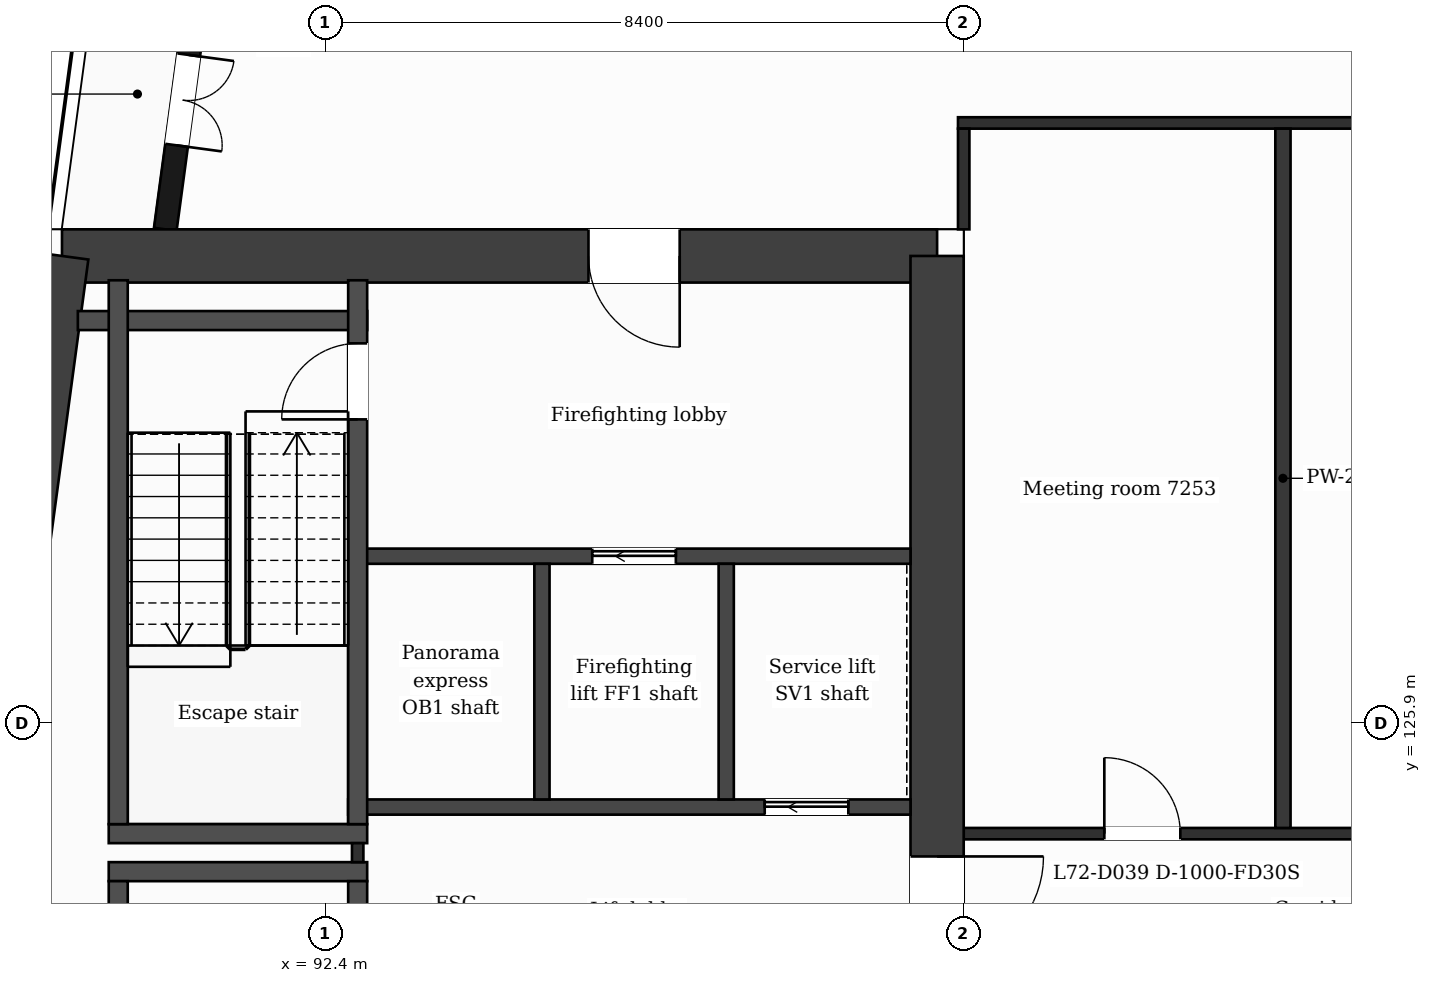
"""IFC4 building model, lengths in metres.
Left out: names, types, materials, properties, quantities, classifications, styles, units other than length and angle.
Written with IfcOpenShell. Run it as: python <this file> out.ifc"""

import sys

from ifc_helpers import new_model, si_unit, direction, frame, frame_2d, origin, place, context, subcontext, project, spatial, rectangle, extrude, element, fill, save


model = new_model("IFC4")
c1 = context("Model", 3, precision=1e-05, world=origin(), true_north=direction((0.0, 1.0)))
c2 = subcontext(c1, "Body", "Model", "MODEL_VIEW")
j1 = project(units=[si_unit("LENGTHUNIT", "METRE"), si_unit("PLANEANGLEUNIT", "RADIAN")], contexts=[c1])
p1 = place(None, origin())
s1 = spatial("IfcSite", under=j1, at=p1, CompositionType="ELEMENT")
p2 = place(p1, origin())
s2 = spatial("IfcBuilding", under=s1, at=p2, CompositionType="ELEMENT")
p3 = place(p2, frame((0.0, 0.0, 296.0)))
s3 = spatial("IfcBuildingStorey", under=s2, at=p3, CompositionType="ELEMENT", Elevation=296.0)
p4 = place(p3, frame((88.937, 132.05, 0.0), z_axis=(0.0, 0.0, 1.0), x_axis=(1.0, 0.0, 0.0)))
e1 = element("IfcWall", 1, at=p4, inside=s3, PredefinedType="SHEAR", context=c2, shape_type="SweptSolid", body=[
    extrude(rectangle(XDim=11.513, YDim=0.7, at=frame_2d((5.757, 0.0))), origin(), (0.0, 0.0, 1.0), 3.7),
])
p5 = place(p4, frame((6.927, 0.0, 0.0)))
e2 = element("IfcOpeningElement", 2, at=p5, cuts=e1, PredefinedType="OPENING", context=c2, shape_type="SweptSolid", body=[
    extrude(rectangle(XDim=1.2, YDim=2.1, at=frame_2d((0.6, 1.05))), frame((0.0, 0.36, 0.0), z_axis=(0.0, -1.0, 0.0), x_axis=(1.0, 0.0, 0.0)), (0.0, 0.0, 1.0), 0.72),
])
p6 = place(p3, frame((100.45, 132.05, 0.0), z_axis=(0.0, 0.0, 1.0), x_axis=(0.0, -1.0, 0.0)))
e3 = element("IfcWall", 3, at=p6, inside=s3, PredefinedType="SHEAR", context=c2, shape_type="SweptSolid", body=[
    extrude(rectangle(XDim=15.7, YDim=0.7, at=frame_2d((7.85, 0.0))), origin(), (0.0, 0.0, 1.0), 3.7),
])
p7 = place(p6, frame((7.9, 0.0, 0.0)))
e4 = element("IfcOpeningElement", 4, at=p7, cuts=e3, PredefinedType="OPENING", context=c2, shape_type="SweptSolid", body=[
    extrude(rectangle(XDim=1.4, YDim=2.1, at=frame_2d((0.7, 1.05))), frame((0.0, 0.36, 0.0), z_axis=(0.0, -1.0, 0.0), x_axis=(1.0, 0.0, 0.0)), (0.0, 0.0, 1.0), 0.72),
])
p8 = place(p3, frame((86.823, 116.35, 0.0), z_axis=(0.0, 0.0, 1.0), x_axis=(0.133416378607, 0.99106007382, 0.0)))
e5 = element("IfcWall", 5, at=p8, inside=s3, PredefinedType="SHEAR", context=c2, shape_type="SweptSolid", body=[
    extrude(rectangle(XDim=15.842, YDim=0.7, at=frame_2d((7.921, 0.0))), origin(), (0.0, 0.0, 1.0), 3.7),
])
p9 = place(p3, frame((91.177, 138.95, 0.0), z_axis=(0.0, 0.0, 1.0), x_axis=(-0.133426664613, -0.991058689065, 0.0)))
e6 = element("IfcWall", 6, at=p9, inside=s3, PredefinedType="SOLIDWALL", context=c2, shape_type="SweptSolid", body=[
    extrude(rectangle(XDim=6.609, YDim=0.3, at=frame_2d((3.305, 0.0))), origin(), (0.0, 0.0, 1.0), 3.38),
])
p10 = place(p9, frame((1.039, 0.0, 0.9)))
e7 = element("IfcOpeningElement", 7, at=p10, cuts=e6, PredefinedType="OPENING", context=c2, shape_type="SweptSolid", body=[
    extrude(rectangle(XDim=1.2, YDim=2.1, at=frame_2d((0.6, 1.05))), frame((0.0, 0.16, 0.0), z_axis=(0.0, -1.0, 0.0), x_axis=(1.0, 0.0, 0.0)), (0.0, 0.0, 1.0), 0.32),
])
p11 = place(p9, frame((4.294, 0.0, 0.0)))
e8 = element("IfcOpeningElement", 8, at=p11, cuts=e6, PredefinedType="OPENING", context=c2, shape_type="SweptSolid", body=[
    extrude(rectangle(XDim=1.2, YDim=2.4, at=frame_2d((0.6, 1.2))), frame((0.0, 0.16, 0.0), z_axis=(0.0, -1.0, 0.0), x_axis=(1.0, 0.0, 0.0)), (0.0, 0.0, 1.0), 0.32),
])
for number, where, z_axis, x_axis in (
    (9, (89.552, 123.95, 0.0), (0.0, 0.0, 1.0), (1.0, 0.0, 0.0)),
    (10, (89.552, 124.45, 0.0), (0.0, 0.0, 1.0), (1.0, 0.0, 0.0)),
):
    element("IfcWall", number, at=place(p3, frame(where, z_axis=z_axis, x_axis=x_axis)), inside=s3, PredefinedType="PARTITIONING", context=c2, shape_type="SweptSolid", body=[
        extrude(rectangle(XDim=3.4, YDim=0.25, at=frame_2d((1.7, 0.0))), origin(), (0.0, 0.0, 1.0), 3.38),
    ])
p12 = place(p3, frame((100.8, 124.45, 0.0), z_axis=(0.0, 0.0, 1.0), x_axis=(1.0, 0.0, 0.0)))
e11 = element("IfcWall", 11, at=p12, inside=s3, PredefinedType="PARTITIONING", context=c2, shape_type="SweptSolid", body=[
    extrude(rectangle(XDim=25.2, YDim=0.15, at=frame_2d((12.6, 0.0))), origin(), (0.0, 0.0, 1.0), 3.38),
])
p13 = place(p12, frame((1.85, 0.0, 0.0)))
e12 = element("IfcOpeningElement", 12, at=p13, cuts=e11, PredefinedType="OPENING", context=c2, shape_type="SweptSolid", body=[
    extrude(rectangle(XDim=1.0, YDim=2.1, at=frame_2d((0.5, 1.05))), frame((0.0, 0.085, 0.0), z_axis=(0.0, -1.0, 0.0), x_axis=(1.0, 0.0, 0.0)), (0.0, 0.0, 1.0), 0.17),
])
p14 = place(p12, frame((6.425, 0.0, 0.0)))
e13 = element("IfcOpeningElement", 13, at=p14, cuts=e11, PredefinedType="OPENING", context=c2, shape_type="SweptSolid", body=[
    extrude(rectangle(XDim=1.0, YDim=2.1, at=frame_2d((0.5, 1.05))), frame((0.0, 0.085, 0.0), z_axis=(0.0, -1.0, 0.0), x_axis=(1.0, 0.0, 0.0)), (0.0, 0.0, 1.0), 0.17),
])
p15 = place(p12, frame((9.4, 0.0, 0.0)))
e14 = element("IfcOpeningElement", 14, at=p15, cuts=e11, PredefinedType="OPENING", context=c2, shape_type="SweptSolid", body=[
    extrude(rectangle(XDim=1.0, YDim=2.1, at=frame_2d((0.5, 1.05))), frame((0.0, 0.085, 0.0), z_axis=(0.0, -1.0, 0.0), x_axis=(1.0, 0.0, 0.0)), (0.0, 0.0, 1.0), 0.17),
])
p16 = place(p12, frame((14.825, 0.0, 0.0)))
e15 = element("IfcOpeningElement", 15, at=p16, cuts=e11, PredefinedType="OPENING", context=c2, shape_type="SweptSolid", body=[
    extrude(rectangle(XDim=1.0, YDim=2.1, at=frame_2d((0.5, 1.05))), frame((0.0, 0.085, 0.0), z_axis=(0.0, -1.0, 0.0), x_axis=(1.0, 0.0, 0.0)), (0.0, 0.0, 1.0), 0.17),
])
p17 = place(p12, frame((18.825, 0.0, 0.0)))
e16 = element("IfcOpeningElement", 16, at=p17, cuts=e11, PredefinedType="OPENING", context=c2, shape_type="SweptSolid", body=[
    extrude(rectangle(XDim=1.0, YDim=2.1, at=frame_2d((0.5, 1.05))), frame((0.0, 0.085, 0.0), z_axis=(0.0, -1.0, 0.0), x_axis=(1.0, 0.0, 0.0)), (0.0, 0.0, 1.0), 0.17),
])
p18 = place(p3, frame((92.702, 124.8, 0.0), z_axis=(0.0, 0.0, 1.0), x_axis=(1.0, 0.0, 0.0)))
e17 = element("IfcWall", 17, at=p18, inside=s3, PredefinedType="PARTITIONING", context=c2, shape_type="SweptSolid", body=[
    extrude(rectangle(XDim=7.398, YDim=0.2, at=frame_2d((3.699, 0.0))), origin(), (0.0, 0.0, 1.0), 3.38),
])
p19 = place(p18, frame((5.48, 0.0, 0.0)))
e18 = element("IfcOpeningElement", 18, at=p19, cuts=e17, PredefinedType="OPENING", context=c2, shape_type="SweptSolid", body=[
    extrude(rectangle(XDim=1.1, YDim=2.1, at=frame_2d((0.55, 1.05))), frame((0.0, 0.11, 0.0), z_axis=(0.0, -1.0, 0.0), x_axis=(1.0, 0.0, 0.0)), (0.0, 0.0, 1.0), 0.22),
])
p20 = place(p3, frame((92.827, 128.1, 0.0), z_axis=(0.0, 0.0, 1.0), x_axis=(1.0, 0.0, 0.0)))
e19 = element("IfcWall", 19, at=p20, inside=s3, PredefinedType="PARTITIONING", context=c2, shape_type="SweptSolid", body=[
    extrude(rectangle(XDim=7.273, YDim=0.2, at=frame_2d((3.637, 0.0))), origin(), (0.0, 0.0, 1.0), 3.38),
])
p21 = place(p20, frame((3.086, 0.0, 0.0)))
e20 = element("IfcOpeningElement", 20, at=p21, cuts=e19, PredefinedType="OPENING", context=c2, shape_type="SweptSolid", body=[
    extrude(rectangle(XDim=1.1, YDim=2.1, at=frame_2d((0.55, 1.05))), frame((0.0, 0.11, 0.0), z_axis=(0.0, -1.0, 0.0), x_axis=(1.0, 0.0, 0.0)), (0.0, 0.0, 1.0), 0.22),
])
p22 = place(p3, frame((89.146, 131.2, 0.0), z_axis=(0.0, 0.0, 1.0), x_axis=(1.0, 0.0, 0.0)))
e21 = element("IfcWall", 21, at=p22, inside=s3, PredefinedType="PARTITIONING", context=c2, shape_type="SweptSolid", body=[
    extrude(rectangle(XDim=3.806, YDim=0.25, at=frame_2d((1.903, 0.0))), origin(), (0.0, 0.0, 1.0), 3.38),
])
p23 = place(p3, frame((100.725, 133.8, 0.0), z_axis=(0.0, 0.0, 1.0), x_axis=(1.0, 0.0, 0.0)))
e22 = element("IfcWall", 22, at=p23, inside=s3, PredefinedType="PARTITIONING", context=c2, shape_type="SweptSolid", body=[
    extrude(rectangle(XDim=25.35, YDim=0.15, at=frame_2d((12.675, 0.0))), origin(), (0.0, 0.0, 1.0), 3.38),
])
p24 = place(p23, frame((9.825, 0.0, 0.0)))
e23 = element("IfcOpeningElement", 23, at=p24, cuts=e22, PredefinedType="OPENING", context=c2, shape_type="SweptSolid", body=[
    extrude(rectangle(XDim=1.0, YDim=2.1, at=frame_2d((0.5, 1.05))), frame((0.0, 0.085, 0.0), z_axis=(0.0, -1.0, 0.0), x_axis=(1.0, 0.0, 0.0)), (0.0, 0.0, 1.0), 0.17),
])
for number, where, z_axis, x_axis in (
    (24, (89.677, 116.67, 0.0), (0.0, 0.0, 1.0), (0.0, 1.0, 0.0)),
    (25, (89.677, 124.575, 0.0), (0.0, 0.0, 1.0), (0.0, 1.0, 0.0)),
):
    element("IfcWall", number, at=place(p3, frame(where, z_axis=z_axis, x_axis=x_axis)), inside=s3, PredefinedType="PARTITIONING", context=c2, shape_type="SweptSolid", body=[
        extrude(rectangle(XDim=7.155, YDim=0.25, at=frame_2d((3.578, 0.0))), origin(), (0.0, 0.0, 1.0), 3.38),
    ])
p25 = place(p3, frame((92.827, 124.075, 0.0), z_axis=(0.0, 0.0, 1.0), x_axis=(0.0, 1.0, 0.0)))
e26 = element("IfcWall", 26, at=p25, inside=s3, PredefinedType="PARTITIONING", context=c2, shape_type="SweptSolid", body=[
    extrude(rectangle(XDim=0.25, YDim=0.15, at=frame_2d((0.125, 0.0))), origin(), (0.0, 0.0, 1.0), 3.38),
])
p26 = place(p3, frame((92.827, 116.67, 0.0), z_axis=(0.0, 0.0, 1.0), x_axis=(0.0, 1.0, 0.0)))
e27 = element("IfcWall", 27, at=p26, inside=s3, PredefinedType="PARTITIONING", context=c2, shape_type="SweptSolid", body=[
    extrude(rectangle(XDim=7.155, YDim=0.25, at=frame_2d((3.578, 0.0))), origin(), (0.0, 0.0, 1.0), 3.38),
])
p27 = place(p26, frame((5.855, 0.0, 0.0)))
e28 = element("IfcOpeningElement", 28, at=p27, cuts=e27, PredefinedType="OPENING", context=c2, shape_type="SweptSolid", body=[
    extrude(rectangle(XDim=0.95, YDim=2.1, at=frame_2d((0.475, 1.05))), frame((0.0, 0.135, 0.0), z_axis=(0.0, -1.0, 0.0), x_axis=(1.0, 0.0, 0.0)), (0.0, 0.0, 1.0), 0.27),
])
p28 = place(p3, frame((92.827, 124.575, 0.0), z_axis=(0.0, 0.0, 1.0), x_axis=(0.0, 1.0, 0.0)))
e29 = element("IfcWall", 29, at=p28, inside=s3, PredefinedType="PARTITIONING", context=c2, shape_type="SweptSolid", body=[
    extrude(rectangle(XDim=7.155, YDim=0.25, at=frame_2d((3.578, 0.0))), origin(), (0.0, 0.0, 1.0), 3.38),
])
p29 = place(p28, frame((5.325, 0.0, 0.0)))
e30 = element("IfcOpeningElement", 30, at=p29, cuts=e29, PredefinedType="OPENING", context=c2, shape_type="SweptSolid", body=[
    extrude(rectangle(XDim=1.0, YDim=2.1, at=frame_2d((0.5, 1.05))), frame((0.0, 0.135, 0.0), z_axis=(0.0, -1.0, 0.0), x_axis=(1.0, 0.0, 0.0)), (0.0, 0.0, 1.0), 0.27),
])
for number, where, z_axis, x_axis in (
    (31, (95.251, 124.9, 0.0), (0.0, 0.0, 1.0), (0.0, 1.0, 0.0)),
    (32, (97.676, 124.9, 0.0), (0.0, 0.0, 1.0), (0.0, 1.0, 0.0)),
):
    element("IfcWall", number, at=place(p3, frame(where, z_axis=z_axis, x_axis=x_axis)), inside=s3, PredefinedType="PARTITIONING", context=c2, shape_type="SweptSolid", body=[
        extrude(rectangle(XDim=3.1, YDim=0.2, at=frame_2d((1.55, 0.0))), origin(), (0.0, 0.0, 1.0), 3.38),
    ])
p30 = place(p3, frame((100.8, 132.4, 0.0), z_axis=(0.0, 0.0, 1.0), x_axis=(0.0, 1.0, 0.0)))
e33 = element("IfcWall", 33, at=p30, inside=s3, PredefinedType="PARTITIONING", context=c2, shape_type="SweptSolid", body=[
    extrude(rectangle(XDim=1.325, YDim=0.15, at=frame_2d((0.663, 0.0))), origin(), (0.0, 0.0, 1.0), 3.38),
])
p31 = place(p3, frame((105.0, 124.525, 0.0), z_axis=(0.0, 0.0, 1.0), x_axis=(0.0, 1.0, 0.0)))
e34 = element("IfcWall", 34, at=p31, inside=s3, PredefinedType="PARTITIONING", context=c2, shape_type="SweptSolid", body=[
    extrude(rectangle(XDim=9.2, YDim=0.2, at=frame_2d((4.6, 0.0))), origin(), (0.0, 0.0, 1.0), 3.38),
])
p32 = place(p11, origin())
e35 = element("IfcDoor", 35, at=p32, inside=s3, OperationType="DOUBLE_DOOR_SINGLE_SWING", PredefinedType="DOOR", context=c2, shape_type="SweptSolid", body=[
    extrude(rectangle(XDim=1.2, YDim=2.4, at=frame_2d((0.6, 1.2))), frame((0.0, 0.025, 0.0), z_axis=(0.0, -1.0, 0.0), x_axis=(1.0, 0.0, 0.0)), (0.0, 0.0, 1.0), 0.05),
])
fill(e8, e35)
p33 = place(p21, origin())
e36 = element("IfcDoor", 36, at=p33, inside=s3, OperationType="SLIDING_TO_LEFT", PredefinedType="DOOR", context=c2, shape_type="SweptSolid", body=[
    extrude(rectangle(XDim=1.1, YDim=2.1, at=frame_2d((0.55, 1.05))), frame((0.0, 0.025, 0.0), z_axis=(0.0, -1.0, 0.0), x_axis=(1.0, 0.0, 0.0)), (0.0, 0.0, 1.0), 0.05),
])
fill(e20, e36)
p34 = place(p19, origin())
e37 = element("IfcDoor", 37, at=p34, inside=s3, OperationType="SLIDING_TO_LEFT", PredefinedType="DOOR", context=c2, shape_type="SweptSolid", body=[
    extrude(rectangle(XDim=1.1, YDim=2.1, at=frame_2d((0.55, 1.05))), frame((0.0, 0.025, 0.0), z_axis=(0.0, -1.0, 0.0), x_axis=(1.0, 0.0, 0.0)), (0.0, 0.0, 1.0), 0.05),
])
fill(e18, e37)
p35 = place(p29, origin())
e38 = element("IfcDoor", 38, at=p35, inside=s3, OperationType="SINGLE_SWING_LEFT", PredefinedType="DOOR", context=c2, shape_type="SweptSolid", body=[
    extrude(rectangle(XDim=1.0, YDim=2.1, at=frame_2d((0.5, 1.05))), frame((0.0, 0.025, 0.0), z_axis=(0.0, -1.0, 0.0), x_axis=(1.0, 0.0, 0.0)), (0.0, 0.0, 1.0), 0.05),
])
fill(e30, e38)
p36 = place(p13, origin())
e39 = element("IfcDoor", 39, at=p36, inside=s3, OperationType="SINGLE_SWING_LEFT", PredefinedType="DOOR", context=c2, shape_type="SweptSolid", body=[
    extrude(rectangle(XDim=1.0, YDim=2.1, at=frame_2d((0.5, 1.05))), frame((0.0, 0.025, 0.0), z_axis=(0.0, -1.0, 0.0), x_axis=(1.0, 0.0, 0.0)), (0.0, 0.0, 1.0), 0.05),
])
fill(e12, e39)
p37 = place(p5, origin())
e40 = element("IfcDoor", 40, at=p37, inside=s3, OperationType="SINGLE_SWING_RIGHT", PredefinedType="DOOR", context=c2, shape_type="SweptSolid", body=[
    extrude(rectangle(XDim=1.2, YDim=2.1, at=frame_2d((0.6, 1.05))), frame((0.0, 0.025, 0.0), z_axis=(0.0, -1.0, 0.0), x_axis=(1.0, 0.0, 0.0)), (0.0, 0.0, 1.0), 0.05),
])
fill(e2, e40)
p38 = place(p7, origin())
e41 = element("IfcDoor", 41, at=p38, inside=s3, OperationType="SINGLE_SWING_LEFT", PredefinedType="DOOR", context=c2, shape_type="SweptSolid", body=[
    extrude(rectangle(XDim=1.4, YDim=2.1, at=frame_2d((0.7, 1.05))), frame((0.0, 0.025, 0.0), z_axis=(0.0, -1.0, 0.0), x_axis=(1.0, 0.0, 0.0)), (0.0, 0.0, 1.0), 0.05),
])
fill(e4, e41)
save(model, sys.argv[1])
